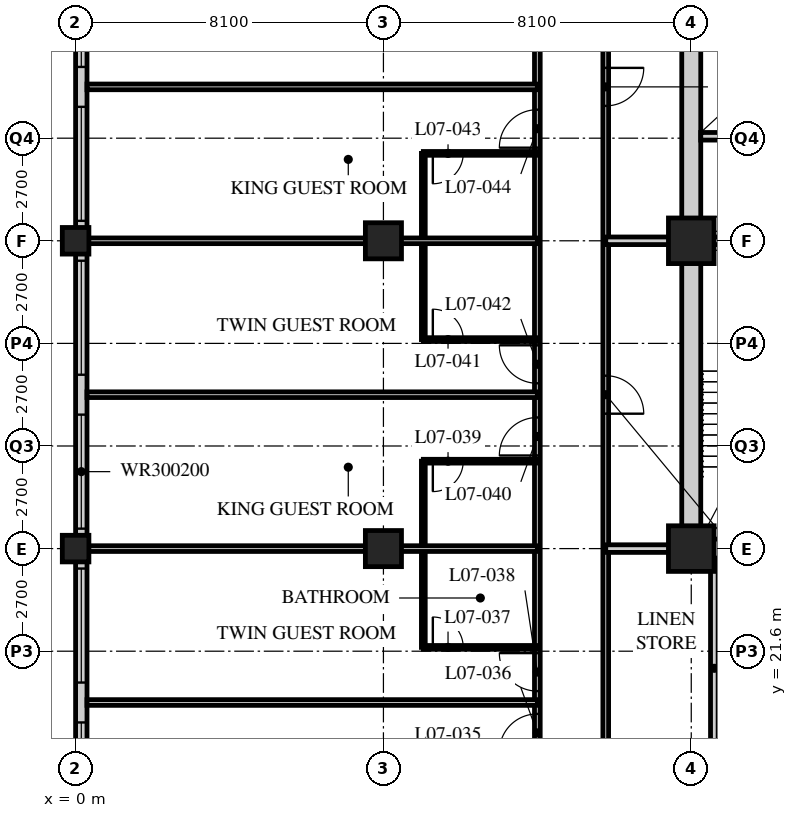
"""IFC4 building model, lengths in metres.
Left out: names, types, materials, properties, quantities, classifications, styles, units other than length and angle.
Written with IfcOpenShell. Run it as: python <this file> out.ifc"""

import sys

from ifc_helpers import new_model, si_unit, direction, frame, frame_2d, origin, origin_2d, place, context, subcontext, project, spatial, rectangle, hollow_rectangle, extrude, element, fill, save


model = new_model("IFC4")
c1 = context("Model", 3, precision=1e-05, world=origin(), true_north=direction((0.0, 1.0)))
c2 = subcontext(c1, "Body", "Model", "MODEL_VIEW")
j1 = project(units=[si_unit("LENGTHUNIT", "METRE"), si_unit("PLANEANGLEUNIT", "RADIAN")], contexts=[c1])
p1 = place(None, origin())
s1 = spatial("IfcSite", under=j1, at=p1, CompositionType="ELEMENT")
p2 = place(p1, origin())
s2 = spatial("IfcBuilding", under=s1, at=p2, CompositionType="ELEMENT")
p3 = place(p2, frame((0.0, 0.0, 36.4)))
s3 = spatial("IfcBuildingStorey", under=s2, at=p3, CompositionType="ELEMENT", Elevation=36.4)
for number, where, z_axis, x_axis in (
    (1, (0.0, 24.3, 0.0), (0.0, 0.0, 1.0), (1.0, 0.0, 0.0)),
    (2, (0.0, 32.4, 0.0), (0.0, 0.0, 1.0), (1.0, 0.0, 0.0)),
):
    element("IfcColumn", number, at=place(p3, frame(where, z_axis=z_axis, x_axis=x_axis)), inside=s3, PredefinedType="COLUMN", context=c2, shape_type="SweptSolid", body=[
        extrude(hollow_rectangle(XDim=0.7, YDim=0.7, WallThickness=0.06, at=origin_2d()), origin(), (0.0, 0.0, 1.0), 3.4),
    ])
for number, where, z_axis, x_axis in (
    (3, (8.1, 24.3, 0.0), (0.0, 0.0, 1.0), (1.0, 0.0, 0.0)),
    (4, (8.1, 32.4, 0.0), (0.0, 0.0, 1.0), (1.0, 0.0, 0.0)),
):
    element("IfcColumn", number, at=place(p3, frame(where, z_axis=z_axis, x_axis=x_axis)), inside=s3, PredefinedType="COLUMN", context=c2, shape_type="SweptSolid", body=[
        extrude(hollow_rectangle(XDim=0.95, YDim=0.95, WallThickness=0.095, at=origin_2d()), origin(), (0.0, 0.0, 1.0), 3.4),
    ])
for number, where, z_axis, x_axis in (
    (5, (16.2, 24.3, 0.0), (0.0, 0.0, 1.0), (1.0, 0.0, 0.0)),
    (6, (16.2, 32.4, 0.0), (0.0, 0.0, 1.0), (1.0, 0.0, 0.0)),
):
    element("IfcColumn", number, at=place(p3, frame(where, z_axis=z_axis, x_axis=x_axis)), inside=s3, PredefinedType="COLUMN", context=c2, shape_type="SweptSolid", body=[
        extrude(hollow_rectangle(XDim=1.2, YDim=1.2, WallThickness=0.12, at=origin_2d()), origin(), (0.0, 0.0, 1.0), 3.4),
    ])
p4 = place(p3, frame((0.15, 40.2, 0.0), z_axis=(0.0, 0.0, 1.0), x_axis=(0.0, -1.0, 0.0)))
e7 = element("IfcWall", 7, at=p4, inside=s3, PredefinedType="SOLIDWALL", context=c2, shape_type="SweptSolid", body=[
    extrude(rectangle(XDim=32.1, YDim=0.3, at=frame_2d((16.05, 0.0))), origin(), (0.0, 0.0, 1.0), 3.19),
])
p5 = place(p4, frame((0.225, 0.0, 0.9)))
e8 = element("IfcOpeningElement", 8, at=p5, cuts=e7, PredefinedType="OPENING", context=c2, shape_type="SweptSolid", body=[
    extrude(rectangle(XDim=3.0, YDim=2.0, at=frame_2d((1.5, 1.0))), frame((0.0, 0.16, 0.0), z_axis=(0.0, -1.0, 0.0), x_axis=(1.0, 0.0, 0.0)), (0.0, 0.0, 1.0), 0.32),
])
p6 = place(p4, frame((4.275, 0.0, 0.9)))
e9 = element("IfcOpeningElement", 9, at=p6, cuts=e7, PredefinedType="OPENING", context=c2, shape_type="SweptSolid", body=[
    extrude(rectangle(XDim=3.0, YDim=2.0, at=frame_2d((1.5, 1.0))), frame((0.0, 0.16, 0.0), z_axis=(0.0, -1.0, 0.0), x_axis=(1.0, 0.0, 0.0)), (0.0, 0.0, 1.0), 0.32),
])
p7 = place(p4, frame((8.325, 0.0, 0.9)))
e10 = element("IfcOpeningElement", 10, at=p7, cuts=e7, PredefinedType="OPENING", context=c2, shape_type="SweptSolid", body=[
    extrude(rectangle(XDim=3.0, YDim=2.0, at=frame_2d((1.5, 1.0))), frame((0.0, 0.16, 0.0), z_axis=(0.0, -1.0, 0.0), x_axis=(1.0, 0.0, 0.0)), (0.0, 0.0, 1.0), 0.32),
])
p8 = place(p4, frame((12.375, 0.0, 0.9)))
e11 = element("IfcOpeningElement", 11, at=p8, cuts=e7, PredefinedType="OPENING", context=c2, shape_type="SweptSolid", body=[
    extrude(rectangle(XDim=3.0, YDim=2.0, at=frame_2d((1.5, 1.0))), frame((0.0, 0.16, 0.0), z_axis=(0.0, -1.0, 0.0), x_axis=(1.0, 0.0, 0.0)), (0.0, 0.0, 1.0), 0.32),
])
p9 = place(p4, frame((16.425, 0.0, 0.9)))
e12 = element("IfcOpeningElement", 12, at=p9, cuts=e7, PredefinedType="OPENING", context=c2, shape_type="SweptSolid", body=[
    extrude(rectangle(XDim=3.0, YDim=2.0, at=frame_2d((1.5, 1.0))), frame((0.0, 0.16, 0.0), z_axis=(0.0, -1.0, 0.0), x_axis=(1.0, 0.0, 0.0)), (0.0, 0.0, 1.0), 0.32),
])
p10 = place(p4, frame((20.475, 0.0, 0.9)))
e13 = element("IfcOpeningElement", 13, at=p10, cuts=e7, PredefinedType="OPENING", context=c2, shape_type="SweptSolid", body=[
    extrude(rectangle(XDim=3.0, YDim=2.0, at=frame_2d((1.5, 1.0))), frame((0.0, 0.16, 0.0), z_axis=(0.0, -1.0, 0.0), x_axis=(1.0, 0.0, 0.0)), (0.0, 0.0, 1.0), 0.32),
])
p11 = place(p4, frame((24.525, 0.0, 0.9)))
e14 = element("IfcOpeningElement", 14, at=p11, cuts=e7, PredefinedType="OPENING", context=c2, shape_type="SweptSolid", body=[
    extrude(rectangle(XDim=3.0, YDim=2.0, at=frame_2d((1.5, 1.0))), frame((0.0, 0.16, 0.0), z_axis=(0.0, -1.0, 0.0), x_axis=(1.0, 0.0, 0.0)), (0.0, 0.0, 1.0), 0.32),
])
p12 = place(p4, frame((28.575, 0.0, 0.9)))
e15 = element("IfcOpeningElement", 15, at=p12, cuts=e7, PredefinedType="OPENING", context=c2, shape_type="SweptSolid", body=[
    extrude(rectangle(XDim=3.0, YDim=2.0, at=frame_2d((1.5, 1.0))), frame((0.0, 0.16, 0.0), z_axis=(0.0, -1.0, 0.0), x_axis=(1.0, 0.0, 0.0)), (0.0, 0.0, 1.0), 0.32),
])
p13 = place(p3, frame((12.15, 16.2, 0.0), z_axis=(0.0, 0.0, 1.0), x_axis=(0.0, 1.0, 0.0)))
e16 = element("IfcWall", 16, at=p13, inside=s3, PredefinedType="PARTITIONING", context=c2, shape_type="SweptSolid", body=[
    extrude(rectangle(XDim=26.1, YDim=0.15, at=frame_2d((13.05, 0.0))), origin(), (0.0, 0.0, 1.0), 3.19),
])
p14 = place(p13, frame((2.75, 0.0, 0.0)))
e17 = element("IfcOpeningElement", 17, at=p14, cuts=e16, PredefinedType="OPENING", context=c2, shape_type="SweptSolid", body=[
    extrude(rectangle(XDim=1.0, YDim=2.1, at=frame_2d((0.5, 1.05))), frame((0.0, 0.085, 0.0), z_axis=(0.0, -1.0, 0.0), x_axis=(1.0, 0.0, 0.0)), (0.0, 0.0, 1.0), 0.17),
])
p15 = place(p13, frame((4.35, 0.0, 0.0)))
e18 = element("IfcOpeningElement", 18, at=p15, cuts=e16, PredefinedType="OPENING", context=c2, shape_type="SweptSolid", body=[
    extrude(rectangle(XDim=1.0, YDim=2.1, at=frame_2d((0.5, 1.05))), frame((0.0, 0.085, 0.0), z_axis=(0.0, -1.0, 0.0), x_axis=(1.0, 0.0, 0.0)), (0.0, 0.0, 1.0), 0.17),
])
p16 = place(p13, frame((10.55, 0.0, 0.0)))
e19 = element("IfcOpeningElement", 19, at=p16, cuts=e16, PredefinedType="OPENING", context=c2, shape_type="SweptSolid", body=[
    extrude(rectangle(XDim=1.0, YDim=2.1, at=frame_2d((0.5, 1.05))), frame((0.0, 0.085, 0.0), z_axis=(0.0, -1.0, 0.0), x_axis=(1.0, 0.0, 0.0)), (0.0, 0.0, 1.0), 0.17),
])
p17 = place(p13, frame((12.45, 0.0, 0.0)))
e20 = element("IfcOpeningElement", 20, at=p17, cuts=e16, PredefinedType="OPENING", context=c2, shape_type="SweptSolid", body=[
    extrude(rectangle(XDim=1.0, YDim=2.1, at=frame_2d((0.5, 1.05))), frame((0.0, 0.085, 0.0), z_axis=(0.0, -1.0, 0.0), x_axis=(1.0, 0.0, 0.0)), (0.0, 0.0, 1.0), 0.17),
])
p18 = place(p13, frame((18.65, 0.0, 0.0)))
e21 = element("IfcOpeningElement", 21, at=p18, cuts=e16, PredefinedType="OPENING", context=c2, shape_type="SweptSolid", body=[
    extrude(rectangle(XDim=1.0, YDim=2.1, at=frame_2d((0.5, 1.05))), frame((0.0, 0.085, 0.0), z_axis=(0.0, -1.0, 0.0), x_axis=(1.0, 0.0, 0.0)), (0.0, 0.0, 1.0), 0.17),
])
p19 = place(p13, frame((22.65, 0.0, 0.0)))
e22 = element("IfcOpeningElement", 22, at=p19, cuts=e16, PredefinedType="OPENING", context=c2, shape_type="SweptSolid", body=[
    extrude(rectangle(XDim=1.0, YDim=2.1, at=frame_2d((0.5, 1.05))), frame((0.0, 0.085, 0.0), z_axis=(0.0, -1.0, 0.0), x_axis=(1.0, 0.0, 0.0)), (0.0, 0.0, 1.0), 0.17),
])
p20 = place(p3, frame((13.95, 40.5, 0.0), z_axis=(0.0, 0.0, 1.0), x_axis=(0.0, -1.0, 0.0)))
e23 = element("IfcWall", 23, at=p20, inside=s3, PredefinedType="PARTITIONING", context=c2, shape_type="SweptSolid", body=[
    extrude(rectangle(XDim=22.5, YDim=0.15, at=frame_2d((11.25, 0.0))), origin(), (0.0, 0.0, 1.0), 3.19),
])
p21 = place(p20, frame((11.65, 0.0, 0.0)))
e24 = element("IfcOpeningElement", 24, at=p21, cuts=e23, PredefinedType="OPENING", context=c2, shape_type="SweptSolid", body=[
    extrude(rectangle(XDim=1.0, YDim=2.1, at=frame_2d((0.5, 1.05))), frame((0.0, 0.085, 0.0), z_axis=(0.0, -1.0, 0.0), x_axis=(1.0, 0.0, 0.0)), (0.0, 0.0, 1.0), 0.17),
])
p22 = place(p20, frame((3.55, 0.0, 0.0)))
e25 = element("IfcOpeningElement", 25, at=p22, cuts=e23, PredefinedType="OPENING", context=c2, shape_type="SweptSolid", body=[
    extrude(rectangle(XDim=1.0, YDim=2.1, at=frame_2d((0.5, 1.05))), frame((0.0, 0.085, 0.0), z_axis=(0.0, -1.0, 0.0), x_axis=(1.0, 0.0, 0.0)), (0.0, 0.0, 1.0), 0.17),
])
p23 = place(p3, frame((13.95, 32.4, 0.0), z_axis=(0.0, 0.0, 1.0), x_axis=(1.0, 0.0, 0.0)))
e26 = element("IfcWall", 26, at=p23, inside=s3, PredefinedType="SOLIDWALL", context=c2, shape_type="SweptSolid", body=[
    extrude(rectangle(XDim=2.25, YDim=0.2, at=frame_2d((1.125, 0.0))), origin(), (0.0, 0.0, 1.0), 2.578),
])
p24 = place(p3, frame((16.807, 18.0, 0.0), z_axis=(0.0, 0.0, 1.0), x_axis=(0.0, 1.0, 0.0)))
e27 = element("IfcWall", 27, at=p24, inside=s3, PredefinedType="SOLIDWALL", context=c2, shape_type="SweptSolid", body=[
    extrude(rectangle(XDim=6.3, YDim=0.2, at=frame_2d((3.15, 0.0))), origin(), (0.0, 0.0, 1.0), 3.19),
])
p25 = place(p3, frame((13.95, 24.3, 0.0), z_axis=(0.0, 0.0, 1.0), x_axis=(1.0, 0.0, 0.0)))
e28 = element("IfcWall", 28, at=p25, inside=s3, PredefinedType="SOLIDWALL", context=c2, shape_type="SweptSolid", body=[
    extrude(rectangle(XDim=2.25, YDim=0.2, at=frame_2d((1.125, 0.0))), origin(), (0.0, 0.0, 1.0), 2.578),
])
p26 = place(p3, frame((12.15, 20.25, 0.0), z_axis=(0.0, 0.0, 1.0), x_axis=(-1.0, 0.0, 0.0)))
e29 = element("IfcWall", 29, at=p26, inside=s3, PredefinedType="PARTITIONING", context=c2, shape_type="SweptSolid", body=[
    extrude(rectangle(XDim=11.85, YDim=0.15, at=frame_2d((5.925, 0.0))), origin(), (0.0, 0.0, 1.0), 3.19),
])
p27 = place(p3, frame((9.15, 21.7, 0.0), z_axis=(0.0, 0.0, 1.0), x_axis=(0.0, 1.0, 0.0)))
e30 = element("IfcWall", 30, at=p27, inside=s3, PredefinedType="PARTITIONING", context=c2, shape_type="SweptSolid", body=[
    extrude(rectangle(XDim=4.9, YDim=0.1, at=frame_2d((2.45, 0.0))), origin(), (0.0, 0.0, 1.0), 3.19),
])
p28 = place(p3, frame((12.15, 21.7, 0.0), z_axis=(0.0, 0.0, 1.0), x_axis=(-1.0, 0.0, 0.0)))
e31 = element("IfcWall", 31, at=p28, inside=s3, PredefinedType="PARTITIONING", context=c2, shape_type="SweptSolid", body=[
    extrude(rectangle(XDim=3.0, YDim=0.1, at=frame_2d((1.5, 0.0))), origin(), (0.0, 0.0, 1.0), 3.19),
])
p29 = place(p28, frame((1.95, 0.0, 0.0)))
e32 = element("IfcOpeningElement", 32, at=p29, cuts=e31, PredefinedType="OPENING", context=c2, shape_type="SweptSolid", body=[
    extrude(rectangle(XDim=0.8, YDim=2.1, at=frame_2d((0.4, 1.05))), frame((0.0, 0.06, 0.0), z_axis=(0.0, -1.0, 0.0), x_axis=(1.0, 0.0, 0.0)), (0.0, 0.0, 1.0), 0.12),
])
p30 = place(p3, frame((12.15, 24.3, 0.0), z_axis=(0.0, 0.0, 1.0), x_axis=(-1.0, 0.0, 0.0)))
e33 = element("IfcWall", 33, at=p30, inside=s3, PredefinedType="PARTITIONING", context=c2, shape_type="SweptSolid", body=[
    extrude(rectangle(XDim=11.85, YDim=0.15, at=frame_2d((5.925, 0.0))), origin(), (0.0, 0.0, 1.0), 2.578),
])
p31 = place(p3, frame((12.15, 26.6, 0.0), z_axis=(0.0, 0.0, 1.0), x_axis=(-1.0, 0.0, 0.0)))
e34 = element("IfcWall", 34, at=p31, inside=s3, PredefinedType="PARTITIONING", context=c2, shape_type="SweptSolid", body=[
    extrude(rectangle(XDim=3.0, YDim=0.1, at=frame_2d((1.5, 0.0))), origin(), (0.0, 0.0, 1.0), 3.19),
])
p32 = place(p31, frame((1.95, 0.0, 0.0)))
e35 = element("IfcOpeningElement", 35, at=p32, cuts=e34, PredefinedType="OPENING", context=c2, shape_type="SweptSolid", body=[
    extrude(rectangle(XDim=0.8, YDim=2.1, at=frame_2d((0.4, 1.05))), frame((0.0, 0.06, 0.0), z_axis=(0.0, -1.0, 0.0), x_axis=(1.0, 0.0, 0.0)), (0.0, 0.0, 1.0), 0.12),
])
p33 = place(p3, frame((12.15, 28.35, 0.0), z_axis=(0.0, 0.0, 1.0), x_axis=(-1.0, 0.0, 0.0)))
e36 = element("IfcWall", 36, at=p33, inside=s3, PredefinedType="PARTITIONING", context=c2, shape_type="SweptSolid", body=[
    extrude(rectangle(XDim=11.85, YDim=0.15, at=frame_2d((5.925, 0.0))), origin(), (0.0, 0.0, 1.0), 3.19),
])
p34 = place(p3, frame((9.15, 29.8, 0.0), z_axis=(0.0, 0.0, 1.0), x_axis=(0.0, 1.0, 0.0)))
e37 = element("IfcWall", 37, at=p34, inside=s3, PredefinedType="PARTITIONING", context=c2, shape_type="SweptSolid", body=[
    extrude(rectangle(XDim=4.9, YDim=0.1, at=frame_2d((2.45, 0.0))), origin(), (0.0, 0.0, 1.0), 3.19),
])
p35 = place(p3, frame((12.15, 29.8, 0.0), z_axis=(0.0, 0.0, 1.0), x_axis=(-1.0, 0.0, 0.0)))
e38 = element("IfcWall", 38, at=p35, inside=s3, PredefinedType="PARTITIONING", context=c2, shape_type="SweptSolid", body=[
    extrude(rectangle(XDim=3.0, YDim=0.1, at=frame_2d((1.5, 0.0))), origin(), (0.0, 0.0, 1.0), 3.19),
])
p36 = place(p35, frame((1.95, 0.0, 0.0)))
e39 = element("IfcOpeningElement", 39, at=p36, cuts=e38, PredefinedType="OPENING", context=c2, shape_type="SweptSolid", body=[
    extrude(rectangle(XDim=0.8, YDim=2.1, at=frame_2d((0.4, 1.05))), frame((0.0, 0.06, 0.0), z_axis=(0.0, -1.0, 0.0), x_axis=(1.0, 0.0, 0.0)), (0.0, 0.0, 1.0), 0.12),
])
p37 = place(p3, frame((12.15, 32.4, 0.0), z_axis=(0.0, 0.0, 1.0), x_axis=(-1.0, 0.0, 0.0)))
e40 = element("IfcWall", 40, at=p37, inside=s3, PredefinedType="PARTITIONING", context=c2, shape_type="SweptSolid", body=[
    extrude(rectangle(XDim=11.85, YDim=0.15, at=frame_2d((5.925, 0.0))), origin(), (0.0, 0.0, 1.0), 2.578),
])
p38 = place(p3, frame((12.15, 34.7, 0.0), z_axis=(0.0, 0.0, 1.0), x_axis=(-1.0, 0.0, 0.0)))
e41 = element("IfcWall", 41, at=p38, inside=s3, PredefinedType="PARTITIONING", context=c2, shape_type="SweptSolid", body=[
    extrude(rectangle(XDim=3.0, YDim=0.1, at=frame_2d((1.5, 0.0))), origin(), (0.0, 0.0, 1.0), 3.19),
])
p39 = place(p38, frame((1.95, 0.0, 0.0)))
e42 = element("IfcOpeningElement", 42, at=p39, cuts=e41, PredefinedType="OPENING", context=c2, shape_type="SweptSolid", body=[
    extrude(rectangle(XDim=0.8, YDim=2.1, at=frame_2d((0.4, 1.05))), frame((0.0, 0.06, 0.0), z_axis=(0.0, -1.0, 0.0), x_axis=(1.0, 0.0, 0.0)), (0.0, 0.0, 1.0), 0.12),
])
p40 = place(p3, frame((12.15, 36.45, 0.0), z_axis=(0.0, 0.0, 1.0), x_axis=(-1.0, 0.0, 0.0)))
e43 = element("IfcWall", 43, at=p40, inside=s3, PredefinedType="PARTITIONING", context=c2, shape_type="SweptSolid", body=[
    extrude(rectangle(XDim=11.85, YDim=0.15, at=frame_2d((5.925, 0.0))), origin(), (0.0, 0.0, 1.0), 3.19),
])
p41 = place(p3, frame((15.95, 24.3, 0.0), z_axis=(0.0, 0.0, 1.0), x_axis=(1.0, 0.0, 0.0)))
e44 = element("IfcWall", 44, at=p41, inside=s3, PredefinedType="SOLIDWALL", context=c2, shape_type="SweptSolid", body=[
    extrude(rectangle(XDim=24.8, YDim=0.5, at=frame_2d((12.4, 0.0))), origin(), (0.0, 0.0, 1.0), 2.54),
])
p42 = place(p41, frame((11.5, 0.0, 0.0)))
e45 = element("IfcOpeningElement", 45, at=p42, cuts=e44, PredefinedType="OPENING", context=c2, shape_type="SweptSolid", body=[
    extrude(rectangle(XDim=1.8, YDim=2.4, at=frame_2d((0.9, 1.2))), frame((0.0, 0.26, 0.0), z_axis=(0.0, -1.0, 0.0), x_axis=(1.0, 0.0, 0.0)), (0.0, 0.0, 1.0), 0.52),
])
p43 = place(p3, frame((16.2, 24.55, 0.0), z_axis=(0.0, 0.0, 1.0), x_axis=(0.0, 1.0, 0.0)))
e46 = element("IfcWall", 46, at=p43, inside=s3, PredefinedType="SOLIDWALL", context=c2, shape_type="SweptSolid", body=[
    extrude(rectangle(XDim=15.7, YDim=0.5, at=frame_2d((7.85, 0.0))), origin(), (0.0, 0.0, 1.0), 2.578),
])
p44 = place(p3, frame((16.45, 32.4, 0.0), z_axis=(0.0, 0.0, 1.0), x_axis=(1.0, 0.0, 0.0)))
e47 = element("IfcWall", 47, at=p44, inside=s3, PredefinedType="SOLIDWALL", context=c2, shape_type="SweptSolid", body=[
    extrude(rectangle(XDim=7.95, YDim=0.2, at=frame_2d((3.975, 0.0))), origin(), (0.0, 0.0, 1.0), 2.578),
])
p45 = place(p3, frame((16.45, 35.15, 0.0), z_axis=(0.0, 0.0, 1.0), x_axis=(1.0, 0.0, 0.0)))
e48 = element("IfcWall", 48, at=p45, inside=s3, PredefinedType="SOLIDWALL", context=c2, shape_type="SweptSolid", body=[
    extrude(rectangle(XDim=2.6, YDim=0.2, at=frame_2d((1.3, 0.0))), origin(), (0.0, 0.0, 1.0), 3.19),
])
p46 = place(p5, origin())
e49 = element("IfcWindow", 49, at=p46, inside=s3, PartitioningType="SINGLE_PANEL", PredefinedType="WINDOW", context=c2, shape_type="SweptSolid", body=[
    extrude(rectangle(XDim=3.0, YDim=2.0, at=frame_2d((1.5, 1.0))), frame((0.0, 0.03, 0.0), z_axis=(0.0, -1.0, 0.0), x_axis=(1.0, 0.0, 0.0)), (0.0, 0.0, 1.0), 0.06),
])
fill(e8, e49)
p47 = place(p6, origin())
e50 = element("IfcWindow", 50, at=p47, inside=s3, PartitioningType="SINGLE_PANEL", PredefinedType="WINDOW", context=c2, shape_type="SweptSolid", body=[
    extrude(rectangle(XDim=3.0, YDim=2.0, at=frame_2d((1.5, 1.0))), frame((0.0, 0.03, 0.0), z_axis=(0.0, -1.0, 0.0), x_axis=(1.0, 0.0, 0.0)), (0.0, 0.0, 1.0), 0.06),
])
fill(e9, e50)
p48 = place(p7, origin())
e51 = element("IfcWindow", 51, at=p48, inside=s3, PartitioningType="SINGLE_PANEL", PredefinedType="WINDOW", context=c2, shape_type="SweptSolid", body=[
    extrude(rectangle(XDim=3.0, YDim=2.0, at=frame_2d((1.5, 1.0))), frame((0.0, 0.03, 0.0), z_axis=(0.0, -1.0, 0.0), x_axis=(1.0, 0.0, 0.0)), (0.0, 0.0, 1.0), 0.06),
])
fill(e10, e51)
p49 = place(p8, origin())
e52 = element("IfcWindow", 52, at=p49, inside=s3, PartitioningType="SINGLE_PANEL", PredefinedType="WINDOW", context=c2, shape_type="SweptSolid", body=[
    extrude(rectangle(XDim=3.0, YDim=2.0, at=frame_2d((1.5, 1.0))), frame((0.0, 0.03, 0.0), z_axis=(0.0, -1.0, 0.0), x_axis=(1.0, 0.0, 0.0)), (0.0, 0.0, 1.0), 0.06),
])
fill(e11, e52)
p50 = place(p9, origin())
e53 = element("IfcWindow", 53, at=p50, inside=s3, PartitioningType="SINGLE_PANEL", PredefinedType="WINDOW", context=c2, shape_type="SweptSolid", body=[
    extrude(rectangle(XDim=3.0, YDim=2.0, at=frame_2d((1.5, 1.0))), frame((0.0, 0.03, 0.0), z_axis=(0.0, -1.0, 0.0), x_axis=(1.0, 0.0, 0.0)), (0.0, 0.0, 1.0), 0.06),
])
fill(e12, e53)
p51 = place(p10, origin())
e54 = element("IfcWindow", 54, at=p51, inside=s3, PartitioningType="SINGLE_PANEL", PredefinedType="WINDOW", context=c2, shape_type="SweptSolid", body=[
    extrude(rectangle(XDim=3.0, YDim=2.0, at=frame_2d((1.5, 1.0))), frame((0.0, 0.03, 0.0), z_axis=(0.0, -1.0, 0.0), x_axis=(1.0, 0.0, 0.0)), (0.0, 0.0, 1.0), 0.06),
])
fill(e13, e54)
p52 = place(p21, origin())
e55 = element("IfcDoor", 55, at=p52, inside=s3, OperationType="SINGLE_SWING_RIGHT", PredefinedType="DOOR", context=c2, shape_type="SweptSolid", body=[
    extrude(rectangle(XDim=1.0, YDim=2.1, at=frame_2d((0.5, 1.05))), frame((0.0, 0.025, 0.0), z_axis=(0.0, -1.0, 0.0), x_axis=(1.0, 0.0, 0.0)), (0.0, 0.0, 1.0), 0.05),
])
fill(e24, e55)
p53 = place(p22, origin())
e56 = element("IfcDoor", 56, at=p53, inside=s3, OperationType="SINGLE_SWING_LEFT", PredefinedType="DOOR", context=c2, shape_type="SweptSolid", body=[
    extrude(rectangle(XDim=1.0, YDim=2.1, at=frame_2d((0.5, 1.05))), frame((0.0, 0.025, 0.0), z_axis=(0.0, -1.0, 0.0), x_axis=(1.0, 0.0, 0.0)), (0.0, 0.0, 1.0), 0.05),
])
fill(e25, e56)
p54 = place(p14, origin())
e57 = element("IfcDoor", 57, at=p54, inside=s3, OperationType="SINGLE_SWING_LEFT", PredefinedType="DOOR", context=c2, shape_type="SweptSolid", body=[
    extrude(rectangle(XDim=1.0, YDim=2.1, at=frame_2d((0.5, 1.05))), frame((0.0, 0.025, 0.0), z_axis=(0.0, -1.0, 0.0), x_axis=(1.0, 0.0, 0.0)), (0.0, 0.0, 1.0), 0.05),
])
fill(e17, e57)
p55 = place(p29, origin())
e58 = element("IfcDoor", 58, at=p55, inside=s3, OperationType="SINGLE_SWING_LEFT", PredefinedType="DOOR", context=c2, shape_type="SweptSolid", body=[
    extrude(rectangle(XDim=0.8, YDim=2.1, at=frame_2d((0.4, 1.05))), frame((0.0, 0.025, 0.0), z_axis=(0.0, -1.0, 0.0), x_axis=(1.0, 0.0, 0.0)), (0.0, 0.0, 1.0), 0.05),
])
fill(e32, e58)
p56 = place(p15, origin())
e59 = element("IfcDoor", 59, at=p56, inside=s3, OperationType="SINGLE_SWING_RIGHT", PredefinedType="DOOR", context=c2, shape_type="SweptSolid", body=[
    extrude(rectangle(XDim=1.0, YDim=2.1, at=frame_2d((0.5, 1.05))), frame((0.0, 0.025, 0.0), z_axis=(0.0, -1.0, 0.0), x_axis=(1.0, 0.0, 0.0)), (0.0, 0.0, 1.0), 0.05),
])
fill(e18, e59)
p57 = place(p32, origin())
e60 = element("IfcDoor", 60, at=p57, inside=s3, OperationType="SINGLE_SWING_RIGHT", PredefinedType="DOOR", context=c2, shape_type="SweptSolid", body=[
    extrude(rectangle(XDim=0.8, YDim=2.1, at=frame_2d((0.4, 1.05))), frame((0.0, 0.025, 0.0), z_axis=(0.0, -1.0, 0.0), x_axis=(1.0, 0.0, 0.0)), (0.0, 0.0, 1.0), 0.05),
])
fill(e35, e60)
p58 = place(p16, origin())
e61 = element("IfcDoor", 61, at=p58, inside=s3, OperationType="SINGLE_SWING_LEFT", PredefinedType="DOOR", context=c2, shape_type="SweptSolid", body=[
    extrude(rectangle(XDim=1.0, YDim=2.1, at=frame_2d((0.5, 1.05))), frame((0.0, 0.025, 0.0), z_axis=(0.0, -1.0, 0.0), x_axis=(1.0, 0.0, 0.0)), (0.0, 0.0, 1.0), 0.05),
])
fill(e19, e61)
p59 = place(p36, origin())
e62 = element("IfcDoor", 62, at=p59, inside=s3, OperationType="SINGLE_SWING_LEFT", PredefinedType="DOOR", context=c2, shape_type="SweptSolid", body=[
    extrude(rectangle(XDim=0.8, YDim=2.1, at=frame_2d((0.4, 1.05))), frame((0.0, 0.025, 0.0), z_axis=(0.0, -1.0, 0.0), x_axis=(1.0, 0.0, 0.0)), (0.0, 0.0, 1.0), 0.05),
])
fill(e39, e62)
p60 = place(p17, origin())
e63 = element("IfcDoor", 63, at=p60, inside=s3, OperationType="SINGLE_SWING_RIGHT", PredefinedType="DOOR", context=c2, shape_type="SweptSolid", body=[
    extrude(rectangle(XDim=1.0, YDim=2.1, at=frame_2d((0.5, 1.05))), frame((0.0, 0.025, 0.0), z_axis=(0.0, -1.0, 0.0), x_axis=(1.0, 0.0, 0.0)), (0.0, 0.0, 1.0), 0.05),
])
fill(e20, e63)
p61 = place(p39, origin())
e64 = element("IfcDoor", 64, at=p61, inside=s3, OperationType="SINGLE_SWING_RIGHT", PredefinedType="DOOR", context=c2, shape_type="SweptSolid", body=[
    extrude(rectangle(XDim=0.8, YDim=2.1, at=frame_2d((0.4, 1.05))), frame((0.0, 0.025, 0.0), z_axis=(0.0, -1.0, 0.0), x_axis=(1.0, 0.0, 0.0)), (0.0, 0.0, 1.0), 0.05),
])
fill(e42, e64)
p62 = place(p18, origin())
e65 = element("IfcDoor", 65, at=p62, inside=s3, OperationType="SINGLE_SWING_LEFT", PredefinedType="DOOR", context=c2, shape_type="SweptSolid", body=[
    extrude(rectangle(XDim=1.0, YDim=2.1, at=frame_2d((0.5, 1.05))), frame((0.0, 0.025, 0.0), z_axis=(0.0, -1.0, 0.0), x_axis=(1.0, 0.0, 0.0)), (0.0, 0.0, 1.0), 0.05),
])
fill(e21, e65)
save(model, sys.argv[1])
